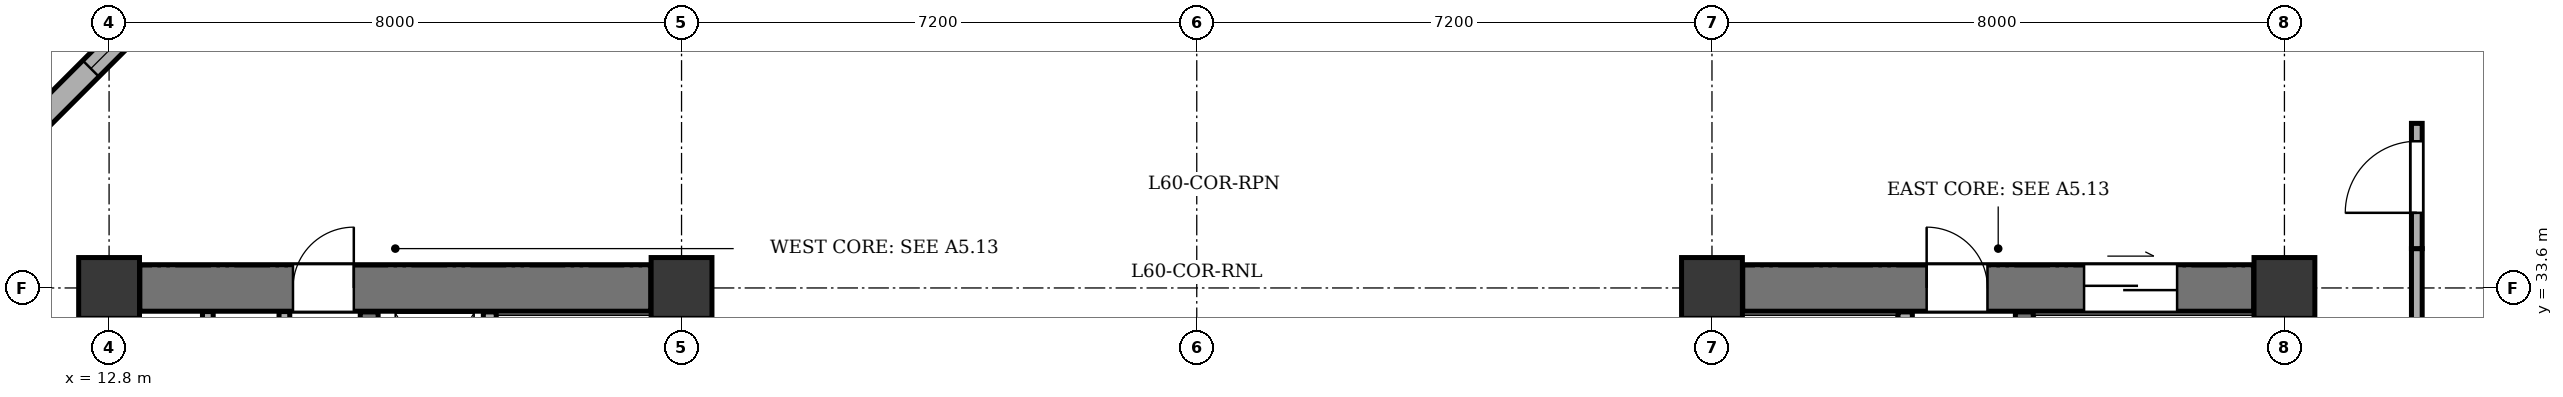
"""IFC4 building model, lengths in metres.
Left out: names, types, materials, properties, quantities, classifications, styles, units other than length and angle.
Written with IfcOpenShell. Run it as: python <this file> out.ifc"""

import sys

from ifc_helpers import new_model, si_unit, direction, frame, frame_2d, origin, origin_2d, place, context, subcontext, project, spatial, rectangle, extrude, element, fill, save


model = new_model("IFC4")
c1 = context("Model", 3, precision=1e-05, world=origin(), true_north=direction((0.0, 1.0)))
c2 = subcontext(c1, "Body", "Model", "MODEL_VIEW")
j1 = project(units=[si_unit("LENGTHUNIT", "METRE"), si_unit("PLANEANGLEUNIT", "RADIAN")], contexts=[c1])
p1 = place(None, origin())
s1 = spatial("IfcSite", under=j1, at=p1, CompositionType="ELEMENT")
p2 = place(p1, origin())
s2 = spatial("IfcBuilding", under=s1, at=p2, CompositionType="ELEMENT")
p3 = place(p2, frame((0.0, 0.0, 231.3)))
s3 = spatial("IfcBuildingStorey", under=s2, at=p3, CompositionType="ELEMENT", Elevation=231.3)
for number, where, z_axis, x_axis in (
    (1, (12.8, 33.6, 0.0), (0.0, 0.0, 1.0), (1.0, 0.0, 0.0)),
    (2, (20.8, 33.6, 0.0), (0.0, 0.0, 1.0), (1.0, 0.0, 0.0)),
    (3, (35.2, 33.6, 0.0), (0.0, 0.0, 1.0), (1.0, 0.0, 0.0)),
    (4, (43.2, 33.6, 0.0), (0.0, 0.0, 1.0), (1.0, 0.0, 0.0)),
):
    element("IfcColumn", number, at=place(p3, frame(where, z_axis=z_axis, x_axis=x_axis)), inside=s3, PredefinedType="COLUMN", context=c2, shape_type="SweptSolid", body=[
        extrude(rectangle(XDim=0.85, YDim=0.85, at=origin_2d()), origin(), (0.0, 0.0, 1.0), 3.4),
    ])
p4 = place(p3, frame((10.88, 35.0, 0.0), z_axis=(0.0, 0.0, 1.0), x_axis=(0.707106781187, 0.707106781187, 0.0)))
e5 = element("IfcWall", 5, at=p4, inside=s3, PredefinedType="STANDARD", context=c2, shape_type="SweptSolid", body=[
    extrude(rectangle(XDim=6.11, YDim=0.32, at=frame_2d((3.055, 0.0))), origin(), (0.0, 0.0, 1.0), 2.725),
])
p5 = place(p4, frame((2.355, 0.0, 0.75)))
e6 = element("IfcOpeningElement", 6, at=p5, cuts=e5, PredefinedType="OPENING", context=c2, shape_type="SweptSolid", body=[
    extrude(rectangle(XDim=1.4, YDim=1.65, at=frame_2d((0.7, 0.825))), frame((0.0, 0.17, 0.0), z_axis=(0.0, -1.0, 0.0), x_axis=(1.0, 0.0, 0.0)), (0.0, 0.0, 1.0), 0.34),
])
p6 = place(p3, frame((13.23, 33.6, 0.0), z_axis=(0.0, 0.0, 1.0), x_axis=(1.0, 0.0, 0.0)))
e7 = element("IfcWall", 7, at=p6, inside=s3, PredefinedType="SHEAR", context=c2, shape_type="SweptSolid", body=[
    extrude(rectangle(XDim=7.14, YDim=0.65, at=frame_2d((3.57, 0.0))), origin(), (0.0, 0.0, 1.0), 3.1),
])
p7 = place(p6, frame((2.14, 0.0, 0.0)))
e8 = element("IfcOpeningElement", 8, at=p7, cuts=e7, PredefinedType="OPENING", context=c2, shape_type="SweptSolid", body=[
    extrude(rectangle(XDim=0.85, YDim=2.02, at=frame_2d((0.425, 1.01))), frame((0.0, 0.335, 0.0), z_axis=(0.0, -1.0, 0.0), x_axis=(1.0, 0.0, 0.0)), (0.0, 0.0, 1.0), 0.67),
])
p8 = place(p3, frame((16.435, 21.135, 0.0), z_axis=(0.0, 0.0, 1.0), x_axis=(0.0, 1.0, 0.0)))
e9 = element("IfcWall", 9, at=p8, inside=s3, PredefinedType="SHEAR", context=c2, shape_type="SweptSolid", body=[
    extrude(rectangle(XDim=12.13, YDim=0.25, at=frame_2d((6.065, 0.0))), origin(), (0.0, 0.0, 1.0), 3.1),
])
p9 = place(p8, frame((0.515, 0.0, 0.0)))
e10 = element("IfcOpeningElement", 10, at=p9, cuts=e9, PredefinedType="OPENING", context=c2, shape_type="SweptSolid", body=[
    extrude(rectangle(XDim=1.2, YDim=2.15, at=frame_2d((0.6, 1.075))), frame((0.0, 0.135, 0.0), z_axis=(0.0, -1.0, 0.0), x_axis=(1.0, 0.0, 0.0)), (0.0, 0.0, 1.0), 0.27),
])
p10 = place(p8, frame((2.665, 0.0, 0.0)))
e11 = element("IfcOpeningElement", 11, at=p10, cuts=e9, PredefinedType="OPENING", context=c2, shape_type="SweptSolid", body=[
    extrude(rectangle(XDim=1.15, YDim=2.15, at=frame_2d((0.575, 1.075))), frame((0.0, 0.135, 0.0), z_axis=(0.0, -1.0, 0.0), x_axis=(1.0, 0.0, 0.0)), (0.0, 0.0, 1.0), 0.27),
])
p11 = place(p3, frame((18.12, 31.17, 0.0), z_axis=(0.0, 0.0, 1.0), x_axis=(0.0, 1.0, 0.0)))
e12 = element("IfcWall", 12, at=p11, inside=s3, PredefinedType="PARTITIONING", context=c2, shape_type="SweptSolid", body=[
    extrude(rectangle(XDim=2.095, YDim=0.18, at=frame_2d((1.047, 0.0))), origin(), (0.0, 0.0, 1.0), 3.1),
])
p12 = place(p3, frame((35.63, 33.6, 0.0), z_axis=(0.0, 0.0, 1.0), x_axis=(1.0, 0.0, 0.0)))
e13 = element("IfcWall", 13, at=p12, inside=s3, PredefinedType="SHEAR", context=c2, shape_type="SweptSolid", body=[
    extrude(rectangle(XDim=7.14, YDim=0.65, at=frame_2d((3.57, 0.0))), origin(), (0.0, 0.0, 1.0), 3.1),
])
p13 = place(p12, frame((4.77, 0.0, 0.0)))
e14 = element("IfcOpeningElement", 14, at=p13, cuts=e13, PredefinedType="OPENING", context=c2, shape_type="SweptSolid", body=[
    extrude(rectangle(XDim=1.3, YDim=2.15, at=frame_2d((0.65, 1.075))), frame((0.0, 0.335, 0.0), z_axis=(0.0, -1.0, 0.0), x_axis=(1.0, 0.0, 0.0)), (0.0, 0.0, 1.0), 0.67),
])
p14 = place(p12, frame((2.57, 0.0, 0.0)))
e15 = element("IfcOpeningElement", 15, at=p14, cuts=e13, PredefinedType="OPENING", context=c2, shape_type="SweptSolid", body=[
    extrude(rectangle(XDim=0.85, YDim=2.02, at=frame_2d((0.425, 1.01))), frame((0.0, 0.335, 0.0), z_axis=(0.0, -1.0, 0.0), x_axis=(1.0, 0.0, 0.0)), (0.0, 0.0, 1.0), 0.67),
])
p15 = place(p3, frame((39.565, 21.135, 0.0), z_axis=(0.0, 0.0, 1.0), x_axis=(0.0, 1.0, 0.0)))
e16 = element("IfcWall", 16, at=p15, inside=s3, PredefinedType="SHEAR", context=c2, shape_type="SweptSolid", body=[
    extrude(rectangle(XDim=12.13, YDim=0.25, at=frame_2d((6.065, 0.0))), origin(), (0.0, 0.0, 1.0), 3.1),
])
p16 = place(p15, frame((0.515, 0.0, 0.0)))
e17 = element("IfcOpeningElement", 17, at=p16, cuts=e16, PredefinedType="OPENING", context=c2, shape_type="SweptSolid", body=[
    extrude(rectangle(XDim=1.2, YDim=2.15, at=frame_2d((0.6, 1.075))), frame((0.0, 0.135, 0.0), z_axis=(0.0, -1.0, 0.0), x_axis=(1.0, 0.0, 0.0)), (0.0, 0.0, 1.0), 0.27),
])
p17 = place(p15, frame((2.665, 0.0, 0.0)))
e18 = element("IfcOpeningElement", 18, at=p17, cuts=e16, PredefinedType="OPENING", context=c2, shape_type="SweptSolid", body=[
    extrude(rectangle(XDim=1.15, YDim=2.15, at=frame_2d((0.575, 1.075))), frame((0.0, 0.135, 0.0), z_axis=(0.0, -1.0, 0.0), x_axis=(1.0, 0.0, 0.0)), (0.0, 0.0, 1.0), 0.27),
])
p18 = place(p3, frame((37.9, 25.27, 0.0), z_axis=(0.0, 0.0, 1.0), x_axis=(0.0, 1.0, 0.0)))
e19 = element("IfcWall", 19, at=p18, inside=s3, PredefinedType="SOLIDWALL", context=c2, shape_type="SweptSolid", body=[
    extrude(rectangle(XDim=7.995, YDim=0.2, at=frame_2d((3.998, 0.0))), origin(), (0.0, 0.0, 1.0), 3.1),
])
p19 = place(p3, frame((14.18, 30.96, 0.0), z_axis=(0.0, 0.0, 1.0), x_axis=(0.0, 1.0, 0.0)))
e20 = element("IfcWall", 20, at=p19, inside=s3, PredefinedType="PARTITIONING", context=c2, shape_type="SweptSolid", body=[
    extrude(rectangle(XDim=2.31, YDim=0.15, at=frame_2d((1.155, 0.0))), origin(), (0.0, 0.0, 1.0), 3.1),
])
p20 = place(p19, frame((0.47, 0.0, 0.0)))
e21 = element("IfcOpeningElement", 21, at=p20, cuts=e20, PredefinedType="OPENING", context=c2, shape_type="SweptSolid", body=[
    extrude(rectangle(XDim=0.85, YDim=2.02, at=frame_2d((0.425, 1.01))), frame((0.0, 0.085, 0.0), z_axis=(0.0, -1.0, 0.0), x_axis=(1.0, 0.0, 0.0)), (0.0, 0.0, 1.0), 0.17),
])
p21 = place(p3, frame((15.25, 30.96, 0.0), z_axis=(0.0, 0.0, 1.0), x_axis=(0.0, 1.0, 0.0)))
e22 = element("IfcWall", 22, at=p21, inside=s3, PredefinedType="PARTITIONING", context=c2, shape_type="SweptSolid", body=[
    extrude(rectangle(XDim=2.31, YDim=0.15, at=frame_2d((1.155, 0.0))), origin(), (0.0, 0.0, 1.0), 3.1),
])
p22 = place(p21, frame((0.47, 0.0, 0.0)))
e23 = element("IfcOpeningElement", 23, at=p22, cuts=e22, PredefinedType="OPENING", context=c2, shape_type="SweptSolid", body=[
    extrude(rectangle(XDim=0.85, YDim=2.02, at=frame_2d((0.425, 1.01))), frame((0.0, 0.085, 0.0), z_axis=(0.0, -1.0, 0.0), x_axis=(1.0, 0.0, 0.0)), (0.0, 0.0, 1.0), 0.17),
])
p23 = place(p3, frame((45.05, 20.25, 0.0), z_axis=(0.0, 0.0, 1.0), x_axis=(0.0, 1.0, 0.0)))
e24 = element("IfcWall", 24, at=p23, inside=s3, PredefinedType="PARTITIONING", context=c2, shape_type="SweptSolid", body=[
    extrude(rectangle(XDim=13.9, YDim=0.15, at=frame_2d((6.95, 0.0))), origin(), (0.0, 0.0, 1.0), 2.725),
])
p24 = place(p3, frame((45.05, 34.15, 0.0), z_axis=(0.0, 0.0, 1.0), x_axis=(0.0, 1.0, 0.0)))
e25 = element("IfcWall", 25, at=p24, inside=s3, PredefinedType="PARTITIONING", context=c2, shape_type="SweptSolid", body=[
    extrude(rectangle(XDim=1.75, YDim=0.15, at=frame_2d((0.875, 0.0))), origin(), (0.0, 0.0, 1.0), 2.725),
])
p25 = place(p24, frame((0.5, 0.0, 0.0)))
e26 = element("IfcOpeningElement", 26, at=p25, cuts=e25, PredefinedType="OPENING", context=c2, shape_type="SweptSolid", body=[
    extrude(rectangle(XDim=1.0, YDim=2.1, at=frame_2d((0.5, 1.05))), frame((0.0, 0.085, 0.0), z_axis=(0.0, -1.0, 0.0), x_axis=(1.0, 0.0, 0.0)), (0.0, 0.0, 1.0), 0.17),
])
p26 = place(p5, origin())
e27 = element("IfcWindow", 27, at=p26, inside=s3, PartitioningType="SINGLE_PANEL", PredefinedType="WINDOW", context=c2, shape_type="SweptSolid", body=[
    extrude(rectangle(XDim=1.4, YDim=1.65, at=frame_2d((0.7, 0.825))), frame((0.0, -0.01, 0.0), z_axis=(0.0, -1.0, 0.0), x_axis=(1.0, 0.0, 0.0)), (0.0, 0.0, 1.0), 0.06),
])
fill(e6, e27)
p27 = place(p7, origin())
e28 = element("IfcDoor", 28, at=p27, inside=s3, OperationType="SINGLE_SWING_RIGHT", PredefinedType="DOOR", context=c2, shape_type="SweptSolid", body=[
    extrude(rectangle(XDim=0.85, YDim=2.02, at=frame_2d((0.425, 1.01))), frame((0.0, 0.025, 0.0), z_axis=(0.0, -1.0, 0.0), x_axis=(1.0, 0.0, 0.0)), (0.0, 0.0, 1.0), 0.05),
])
fill(e8, e28)
p28 = place(p13, origin())
e29 = element("IfcDoor", 29, at=p28, inside=s3, OperationType="DOUBLE_DOOR_SLIDING", PredefinedType="DOOR", context=c2, shape_type="SweptSolid", body=[
    extrude(rectangle(XDim=1.3, YDim=2.15, at=frame_2d((0.65, 1.075))), frame((0.0, 0.025, 0.0), z_axis=(0.0, -1.0, 0.0), x_axis=(1.0, 0.0, 0.0)), (0.0, 0.0, 1.0), 0.05),
])
fill(e14, e29)
p29 = place(p14, origin())
e30 = element("IfcDoor", 30, at=p29, inside=s3, OperationType="SINGLE_SWING_LEFT", PredefinedType="DOOR", context=c2, shape_type="SweptSolid", body=[
    extrude(rectangle(XDim=0.85, YDim=2.02, at=frame_2d((0.425, 1.01))), frame((0.0, 0.025, 0.0), z_axis=(0.0, -1.0, 0.0), x_axis=(1.0, 0.0, 0.0)), (0.0, 0.0, 1.0), 0.05),
])
fill(e15, e30)
p30 = place(p25, origin())
e31 = element("IfcDoor", 31, at=p30, inside=s3, OperationType="SINGLE_SWING_LEFT", PredefinedType="DOOR", context=c2, shape_type="SweptSolid", body=[
    extrude(rectangle(XDim=1.0, YDim=2.1, at=frame_2d((0.5, 1.05))), frame((0.0, 0.025, 0.0), z_axis=(0.0, -1.0, 0.0), x_axis=(1.0, 0.0, 0.0)), (0.0, 0.0, 1.0), 0.05),
])
fill(e26, e31)
save(model, sys.argv[1])
